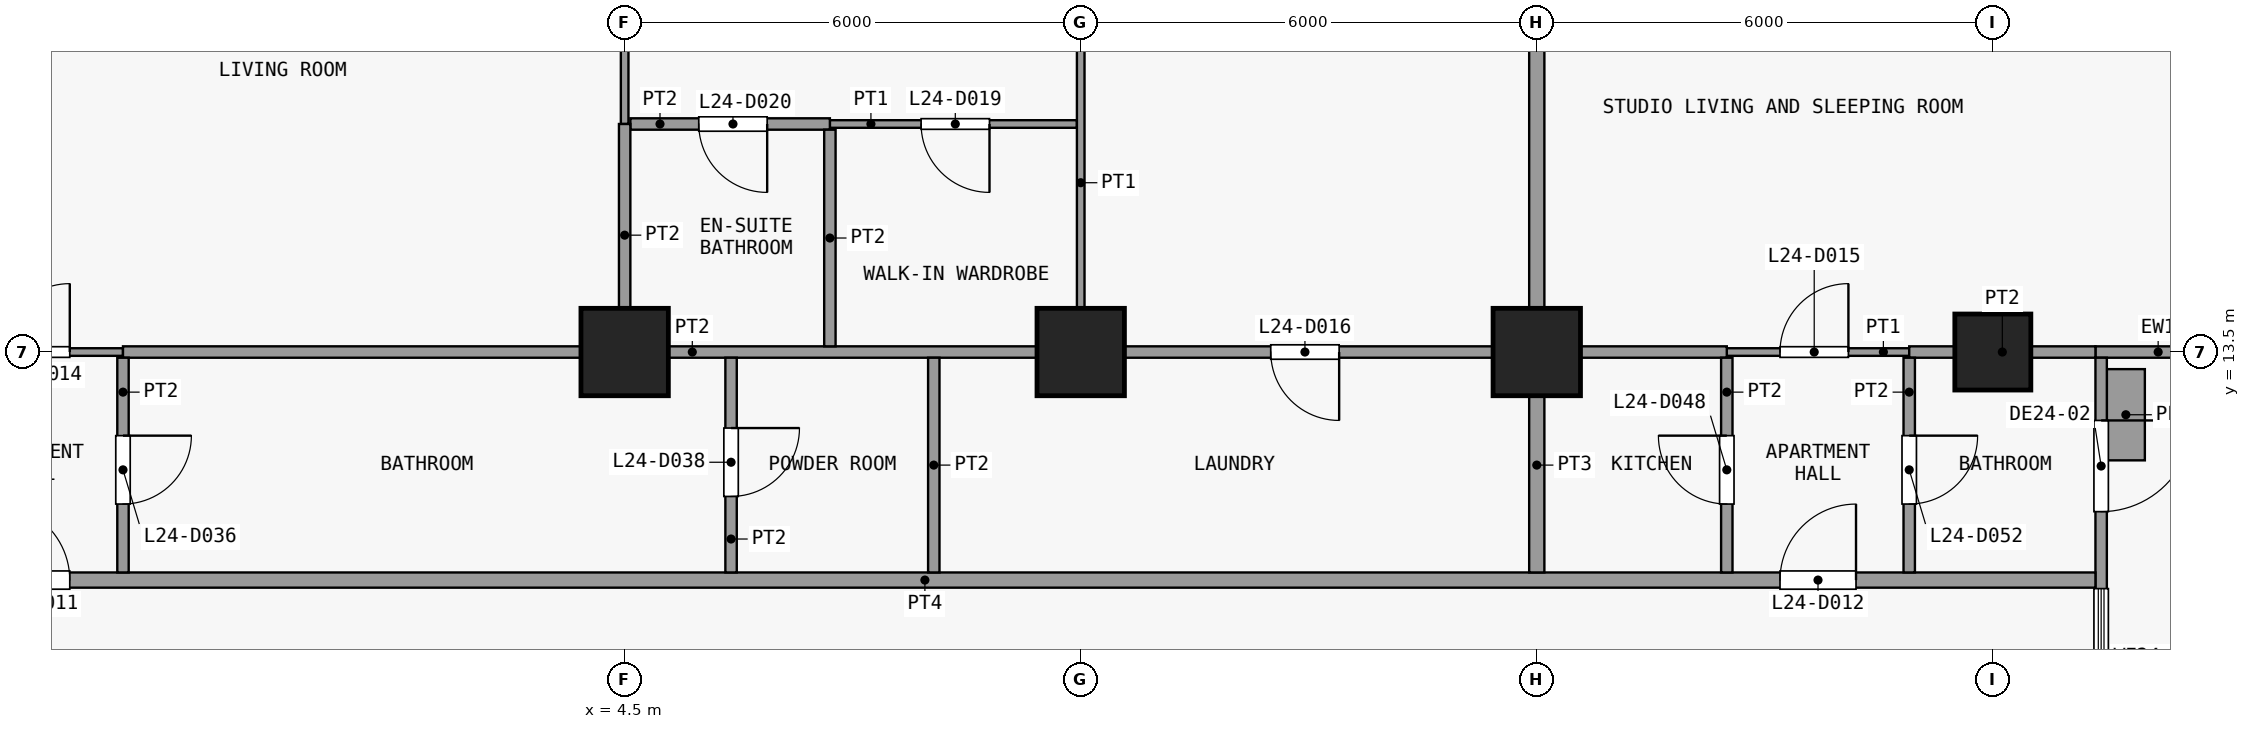
"""IFC4 building model, lengths in metres.
Left out: names, types, materials, properties, quantities, classifications, styles, units other than length and angle.
Written with IfcOpenShell. Run it as: python <this file> out.ifc"""

import sys

from ifc_helpers import new_model, si_unit, direction, frame, frame_2d, origin, origin_2d, place, context, subcontext, project, spatial, rectangle, extrude, element, fill, save


model = new_model("IFC4")
c1 = context("Model", 3, precision=1e-05, world=origin(), true_north=direction((0.0, 1.0)))
c2 = subcontext(c1, "Body", "Model", "MODEL_VIEW")
j1 = project(units=[si_unit("LENGTHUNIT", "METRE"), si_unit("PLANEANGLEUNIT", "RADIAN")], contexts=[c1])
p1 = place(None, origin())
s1 = spatial("IfcSite", under=j1, at=p1, CompositionType="ELEMENT")
p2 = place(p1, origin())
s2 = spatial("IfcBuilding", under=s1, at=p2, CompositionType="ELEMENT")
p3 = place(p2, frame((0.0, 0.0, 99.1)))
s3 = spatial("IfcBuildingStorey", under=s2, at=p3, CompositionType="ELEMENT", Elevation=99.1)
for number, where, z_axis, x_axis in (
    (1, (4.5, 13.5, 0.0), (0.0, 0.0, 1.0), (1.0, 0.0, 0.0)),
    (2, (10.5, 13.5, 0.0), (0.0, 0.0, 1.0), (1.0, 0.0, 0.0)),
    (3, (16.5, 13.5, 0.0), (0.0, 0.0, 1.0), (1.0, 0.0, 0.0)),
):
    element("IfcColumn", number, at=place(p3, frame(where, z_axis=z_axis, x_axis=x_axis)), inside=s3, PredefinedType="COLUMN", context=c2, shape_type="SweptSolid", body=[
        extrude(rectangle(XDim=1.15, YDim=1.15, at=origin_2d()), origin(), (0.0, 0.0, 1.0), 3.6),
    ])
p4 = place(p3, frame((22.5, 13.5, 0.0), z_axis=(0.0, 0.0, 1.0), x_axis=(1.0, 0.0, 0.0)))
e4 = element("IfcColumn", 4, at=p4, inside=s3, PredefinedType="COLUMN", context=c2, shape_type="SweptSolid", body=[
    extrude(rectangle(XDim=1.0, YDim=1.0, at=origin_2d()), origin(), (0.0, 0.0, 1.0), 3.6),
])
p5 = place(p3, frame((23.85, 13.5, 0.0), z_axis=(0.0, 0.0, 1.0), x_axis=(1.0, 0.0, 0.0)))
e5 = element("IfcWall", 5, at=p5, inside=s3, PredefinedType="SOLIDWALL", context=c2, shape_type="SweptSolid", body=[
    extrude(rectangle(XDim=1.65, YDim=0.15, at=frame_2d((0.825, 0.0))), origin(), (0.0, 0.0, 1.0), 3.3),
])
p6 = place(p3, frame((23.925, 13.425, 0.0), z_axis=(0.0, 0.0, 1.0), x_axis=(0.0, -1.0, 0.0)))
e6 = element("IfcWall", 6, at=p6, inside=s3, PredefinedType="SOLIDWALL", context=c2, shape_type="SweptSolid", body=[
    extrude(rectangle(XDim=5.85, YDim=0.15, at=frame_2d((2.925, 0.0))), origin(), (0.0, 0.0, 1.0), 3.3),
])
p7 = place(p6, frame((0.825, 0.0, 0.0)))
e7 = element("IfcOpeningElement", 7, at=p7, cuts=e6, PredefinedType="OPENING", context=c2, shape_type="SweptSolid", body=[
    extrude(rectangle(XDim=1.2, YDim=2.4, at=frame_2d((0.6, 1.2))), frame((0.0, 0.085, 0.0), z_axis=(0.0, -1.0, 0.0), x_axis=(1.0, 0.0, 0.0)), (0.0, 0.0, 1.0), 0.17),
])
p8 = place(p6, frame((3.038, 0.0, 0.9)))
e8 = element("IfcOpeningElement", 8, at=p8, cuts=e6, PredefinedType="OPENING", context=c2, shape_type="SweptSolid", body=[
    extrude(rectangle(XDim=1.8, YDim=2.1, at=frame_2d((0.9, 1.05))), frame((0.0, 0.085, 0.0), z_axis=(0.0, -1.0, 0.0), x_axis=(1.0, 0.0, 0.0)), (0.0, 0.0, 1.0), 0.17),
])
p9 = place(p3, frame((24.25, 12.075, 0.0), z_axis=(0.0, 0.0, 1.0), x_axis=(0.0, 1.0, 0.0)))
e9 = element("IfcWall", 9, at=p9, inside=s3, PredefinedType="USERDEFINED", context=c2, shape_type="SweptSolid", body=[
    extrude(rectangle(XDim=1.2, YDim=0.5, at=frame_2d((0.6, 0.0))), origin(), (0.0, 0.0, 1.0), 0.9),
])
p10 = place(p3, frame((-25.35, 10.5, 0.0), z_axis=(0.0, 0.0, 1.0), x_axis=(1.0, 0.0, 0.0)))
e10 = element("IfcWall", 10, at=p10, inside=s3, PredefinedType="PARTITIONING", context=c2, shape_type="SweptSolid", body=[
    extrude(rectangle(XDim=49.2, YDim=0.2, at=frame_2d((24.6, 0.0))), origin(), (0.0, 0.0, 1.0), 3.3),
])
p11 = place(p10, frame((7.05, 0.0, 0.0)))
e11 = element("IfcOpeningElement", 11, at=p11, cuts=e10, PredefinedType="OPENING", context=c2, shape_type="SweptSolid", body=[
    extrude(rectangle(XDim=1.0, YDim=2.1, at=frame_2d((0.5, 1.05))), frame((0.0, 0.11, 0.0), z_axis=(0.0, -1.0, 0.0), x_axis=(1.0, 0.0, 0.0)), (0.0, 0.0, 1.0), 0.22),
])
p12 = place(p10, frame((21.55, 0.0, 0.0)))
e12 = element("IfcOpeningElement", 12, at=p12, cuts=e10, PredefinedType="OPENING", context=c2, shape_type="SweptSolid", body=[
    extrude(rectangle(XDim=1.0, YDim=2.1, at=frame_2d((0.5, 1.05))), frame((0.0, 0.11, 0.0), z_axis=(0.0, -1.0, 0.0), x_axis=(1.0, 0.0, 0.0)), (0.0, 0.0, 1.0), 0.22),
])
p13 = place(p10, frame((45.05, 0.0, 0.0)))
e13 = element("IfcOpeningElement", 13, at=p13, cuts=e10, PredefinedType="OPENING", context=c2, shape_type="SweptSolid", body=[
    extrude(rectangle(XDim=1.0, YDim=2.1, at=frame_2d((0.5, 1.05))), frame((0.0, 0.11, 0.0), z_axis=(0.0, -1.0, 0.0), x_axis=(1.0, 0.0, 0.0)), (0.0, 0.0, 1.0), 0.22),
])
p14 = place(p3, frame((-4.5, 13.5, 0.0), z_axis=(0.0, 0.0, 1.0), x_axis=(1.0, 0.0, 0.0)))
e14 = element("IfcWall", 14, at=p14, inside=s3, PredefinedType="PARTITIONING", context=c2, shape_type="SweptSolid", body=[
    extrude(rectangle(XDim=2.4, YDim=0.1, at=frame_2d((1.2, 0.0))), origin(), (0.0, 0.0, 1.0), 3.3),
])
p15 = place(p14, frame((0.8, 0.0, 0.0)))
e15 = element("IfcOpeningElement", 15, at=p15, cuts=e14, PredefinedType="OPENING", context=c2, shape_type="SweptSolid", body=[
    extrude(rectangle(XDim=0.9, YDim=2.1, at=frame_2d((0.45, 1.05))), frame((0.0, 0.06, 0.0), z_axis=(0.0, -1.0, 0.0), x_axis=(1.0, 0.0, 0.0)), (0.0, 0.0, 1.0), 0.12),
])
p16 = place(p3, frame((19.0, 13.5, 0.0), z_axis=(0.0, 0.0, 1.0), x_axis=(1.0, 0.0, 0.0)))
e16 = element("IfcWall", 16, at=p16, inside=s3, PredefinedType="PARTITIONING", context=c2, shape_type="SweptSolid", body=[
    extrude(rectangle(XDim=2.4, YDim=0.1, at=frame_2d((1.2, 0.0))), origin(), (0.0, 0.0, 1.0), 3.3),
])
p17 = place(p16, frame((0.7, 0.0, 0.0)))
e17 = element("IfcOpeningElement", 17, at=p17, cuts=e16, PredefinedType="OPENING", context=c2, shape_type="SweptSolid", body=[
    extrude(rectangle(XDim=0.9, YDim=2.1, at=frame_2d((0.45, 1.05))), frame((0.0, 0.06, 0.0), z_axis=(0.0, -1.0, 0.0), x_axis=(1.0, 0.0, 0.0)), (0.0, 0.0, 1.0), 0.12),
])
p18 = place(p3, frame((-2.1, 13.5, 0.0), z_axis=(0.0, 0.0, 1.0), x_axis=(1.0, 0.0, 0.0)))
e18 = element("IfcWall", 18, at=p18, inside=s3, PredefinedType="PARTITIONING", context=c2, shape_type="SweptSolid", body=[
    extrude(rectangle(XDim=21.1, YDim=0.15, at=frame_2d((10.55, 0.0))), origin(), (0.0, 0.0, 1.0), 3.3),
])
p19 = place(p18, frame((15.1, 0.0, 0.0)))
e19 = element("IfcOpeningElement", 19, at=p19, cuts=e18, PredefinedType="OPENING", context=c2, shape_type="SweptSolid", body=[
    extrude(rectangle(XDim=0.9, YDim=2.1, at=frame_2d((0.45, 1.05))), frame((0.0, 0.085, 0.0), z_axis=(0.0, -1.0, 0.0), x_axis=(1.0, 0.0, 0.0)), (0.0, 0.0, 1.0), 0.17),
])
p20 = place(p3, frame((21.4, 13.5, 0.0), z_axis=(0.0, 0.0, 1.0), x_axis=(1.0, 0.0, 0.0)))
e20 = element("IfcWall", 20, at=p20, inside=s3, PredefinedType="PARTITIONING", context=c2, shape_type="SweptSolid", body=[
    extrude(rectangle(XDim=2.45, YDim=0.15, at=frame_2d((1.225, 0.0))), origin(), (0.0, 0.0, 1.0), 3.3),
])
p21 = place(p3, frame((7.2, 16.5, 0.0), z_axis=(0.0, 0.0, 1.0), x_axis=(1.0, 0.0, 0.0)))
e21 = element("IfcWall", 21, at=p21, inside=s3, PredefinedType="PARTITIONING", context=c2, shape_type="SweptSolid", body=[
    extrude(rectangle(XDim=3.25, YDim=0.1, at=frame_2d((1.625, 0.0))), origin(), (0.0, 0.0, 1.0), 3.3),
])
p22 = place(p21, frame((1.2, 0.0, 0.0)))
e22 = element("IfcOpeningElement", 22, at=p22, cuts=e21, PredefinedType="OPENING", context=c2, shape_type="SweptSolid", body=[
    extrude(rectangle(XDim=0.9, YDim=2.1, at=frame_2d((0.45, 1.05))), frame((0.0, 0.06, 0.0), z_axis=(0.0, -1.0, 0.0), x_axis=(1.0, 0.0, 0.0)), (0.0, 0.0, 1.0), 0.12),
])
p23 = place(p3, frame((4.575, 16.5, 0.0), z_axis=(0.0, 0.0, 1.0), x_axis=(1.0, 0.0, 0.0)))
e23 = element("IfcWall", 23, at=p23, inside=s3, PredefinedType="PARTITIONING", context=c2, shape_type="SweptSolid", body=[
    extrude(rectangle(XDim=2.625, YDim=0.15, at=frame_2d((1.312, 0.0))), origin(), (0.0, 0.0, 1.0), 3.3),
])
p24 = place(p23, frame((0.9, 0.0, 0.0)))
e24 = element("IfcOpeningElement", 24, at=p24, cuts=e23, PredefinedType="OPENING", context=c2, shape_type="SweptSolid", body=[
    extrude(rectangle(XDim=0.9, YDim=2.1, at=frame_2d((0.45, 1.05))), frame((0.0, 0.085, 0.0), z_axis=(0.0, -1.0, 0.0), x_axis=(1.0, 0.0, 0.0)), (0.0, 0.0, 1.0), 0.17),
])
p25 = place(p3, frame((-2.1, 10.6, 0.0), z_axis=(0.0, 0.0, 1.0), x_axis=(0.0, 1.0, 0.0)))
e25 = element("IfcWall", 25, at=p25, inside=s3, PredefinedType="PARTITIONING", context=c2, shape_type="SweptSolid", body=[
    extrude(rectangle(XDim=2.825, YDim=0.15, at=frame_2d((1.413, 0.0))), origin(), (0.0, 0.0, 1.0), 3.3),
])
p26 = place(p25, frame((0.9, 0.0, 0.0)))
e26 = element("IfcOpeningElement", 26, at=p26, cuts=e25, PredefinedType="OPENING", context=c2, shape_type="SweptSolid", body=[
    extrude(rectangle(XDim=0.9, YDim=2.1, at=frame_2d((0.45, 1.05))), frame((0.0, 0.085, 0.0), z_axis=(0.0, -1.0, 0.0), x_axis=(1.0, 0.0, 0.0)), (0.0, 0.0, 1.0), 0.17),
])
p27 = place(p3, frame((4.5, 16.5, 0.0), z_axis=(0.0, 0.0, 1.0), x_axis=(0.0, 1.0, 0.0)))
e27 = element("IfcWall", 27, at=p27, inside=s3, PredefinedType="PARTITIONING", context=c2, shape_type="SweptSolid", body=[
    extrude(rectangle(XDim=4.35, YDim=0.1, at=frame_2d((2.175, 0.0))), origin(), (0.0, 0.0, 1.0), 3.3),
])
p28 = place(p27, frame((1.5, 0.0, 0.0)))
e28 = element("IfcOpeningElement", 28, at=p28, cuts=e27, PredefinedType="OPENING", context=c2, shape_type="SweptSolid", body=[
    extrude(rectangle(XDim=0.9, YDim=2.1, at=frame_2d((0.45, 1.05))), frame((0.0, 0.06, 0.0), z_axis=(0.0, -1.0, 0.0), x_axis=(1.0, 0.0, 0.0)), (0.0, 0.0, 1.0), 0.12),
])
p29 = place(p3, frame((4.5, 13.575, 0.0), z_axis=(0.0, 0.0, 1.0), x_axis=(0.0, 1.0, 0.0)))
e29 = element("IfcWall", 29, at=p29, inside=s3, PredefinedType="PARTITIONING", context=c2, shape_type="SweptSolid", body=[
    extrude(rectangle(XDim=2.925, YDim=0.15, at=frame_2d((1.462, 0.0))), origin(), (0.0, 0.0, 1.0), 3.3),
])
p30 = place(p3, frame((5.9, 10.6, 0.0), z_axis=(0.0, 0.0, 1.0), x_axis=(0.0, 1.0, 0.0)))
e30 = element("IfcWall", 30, at=p30, inside=s3, PredefinedType="PARTITIONING", context=c2, shape_type="SweptSolid", body=[
    extrude(rectangle(XDim=2.825, YDim=0.15, at=frame_2d((1.413, 0.0))), origin(), (0.0, 0.0, 1.0), 3.3),
])
p31 = place(p30, frame((1.0, 0.0, 0.0)))
e31 = element("IfcOpeningElement", 31, at=p31, cuts=e30, PredefinedType="OPENING", context=c2, shape_type="SweptSolid", body=[
    extrude(rectangle(XDim=0.9, YDim=2.1, at=frame_2d((0.45, 1.05))), frame((0.0, 0.085, 0.0), z_axis=(0.0, -1.0, 0.0), x_axis=(1.0, 0.0, 0.0)), (0.0, 0.0, 1.0), 0.17),
])
p32 = place(p3, frame((7.2, 13.575, 0.0), z_axis=(0.0, 0.0, 1.0), x_axis=(0.0, 1.0, 0.0)))
e32 = element("IfcWall", 32, at=p32, inside=s3, PredefinedType="PARTITIONING", context=c2, shape_type="SweptSolid", body=[
    extrude(rectangle(XDim=2.85, YDim=0.15, at=frame_2d((1.425, 0.0))), origin(), (0.0, 0.0, 1.0), 3.3),
])
p33 = place(p3, frame((8.567, 10.6, 0.0), z_axis=(0.0, 0.0, 1.0), x_axis=(0.0, 1.0, 0.0)))
e33 = element("IfcWall", 33, at=p33, inside=s3, PredefinedType="PARTITIONING", context=c2, shape_type="SweptSolid", body=[
    extrude(rectangle(XDim=2.825, YDim=0.15, at=frame_2d((1.413, 0.0))), origin(), (0.0, 0.0, 1.0), 3.3),
])
p34 = place(p3, frame((10.5, 13.575, 0.0), z_axis=(0.0, 0.0, 1.0), x_axis=(0.0, 1.0, 0.0)))
e34 = element("IfcWall", 34, at=p34, inside=s3, PredefinedType="PARTITIONING", context=c2, shape_type="SweptSolid", body=[
    extrude(rectangle(XDim=8.675, YDim=0.1, at=frame_2d((4.337, 0.0))), origin(), (0.0, 0.0, 1.0), 3.3),
])
p35 = place(p34, frame((4.425, 0.0, 0.0)))
e35 = element("IfcOpeningElement", 35, at=p35, cuts=e34, PredefinedType="OPENING", context=c2, shape_type="SweptSolid", body=[
    extrude(rectangle(XDim=0.9, YDim=2.1, at=frame_2d((0.45, 1.05))), frame((0.0, 0.06, 0.0), z_axis=(0.0, -1.0, 0.0), x_axis=(1.0, 0.0, 0.0)), (0.0, 0.0, 1.0), 0.12),
])
p36 = place(p3, frame((16.5, 10.6, 0.0), z_axis=(0.0, 0.0, 1.0), x_axis=(0.0, 1.0, 0.0)))
e36 = element("IfcWall", 36, at=p36, inside=s3, PredefinedType="PARTITIONING", context=c2, shape_type="SweptSolid", body=[
    extrude(rectangle(XDim=2.825, YDim=0.2, at=frame_2d((1.413, 0.0))), origin(), (0.0, 0.0, 1.0), 3.3),
])
p37 = place(p3, frame((16.5, 13.575, 0.0), z_axis=(0.0, 0.0, 1.0), x_axis=(0.0, 1.0, 0.0)))
e37 = element("IfcWall", 37, at=p37, inside=s3, PredefinedType="PARTITIONING", context=c2, shape_type="SweptSolid", body=[
    extrude(rectangle(XDim=8.675, YDim=0.2, at=frame_2d((4.337, 0.0))), origin(), (0.0, 0.0, 1.0), 3.3),
])
p38 = place(p3, frame((19.0, 10.6, 0.0), z_axis=(0.0, 0.0, 1.0), x_axis=(0.0, 1.0, 0.0)))
e38 = element("IfcWall", 38, at=p38, inside=s3, PredefinedType="PARTITIONING", context=c2, shape_type="SweptSolid", body=[
    extrude(rectangle(XDim=2.825, YDim=0.15, at=frame_2d((1.413, 0.0))), origin(), (0.0, 0.0, 1.0), 3.3),
])
p39 = place(p38, frame((0.9, 0.0, 0.0)))
e39 = element("IfcOpeningElement", 39, at=p39, cuts=e38, PredefinedType="OPENING", context=c2, shape_type="SweptSolid", body=[
    extrude(rectangle(XDim=0.9, YDim=2.1, at=frame_2d((0.45, 1.05))), frame((0.0, 0.085, 0.0), z_axis=(0.0, -1.0, 0.0), x_axis=(1.0, 0.0, 0.0)), (0.0, 0.0, 1.0), 0.17),
])
p40 = place(p3, frame((21.4, 10.6, 0.0), z_axis=(0.0, 0.0, 1.0), x_axis=(0.0, 1.0, 0.0)))
e40 = element("IfcWall", 40, at=p40, inside=s3, PredefinedType="PARTITIONING", context=c2, shape_type="SweptSolid", body=[
    extrude(rectangle(XDim=2.825, YDim=0.15, at=frame_2d((1.413, 0.0))), origin(), (0.0, 0.0, 1.0), 3.3),
])
p41 = place(p40, frame((0.9, 0.0, 0.0)))
e41 = element("IfcOpeningElement", 41, at=p41, cuts=e40, PredefinedType="OPENING", context=c2, shape_type="SweptSolid", body=[
    extrude(rectangle(XDim=0.9, YDim=2.1, at=frame_2d((0.45, 1.05))), frame((0.0, 0.085, 0.0), z_axis=(0.0, -1.0, 0.0), x_axis=(1.0, 0.0, 0.0)), (0.0, 0.0, 1.0), 0.17),
])
p42 = place(p7, origin())
e42 = element("IfcDoor", 42, at=p42, inside=s3, OperationType="SINGLE_SWING_LEFT", PredefinedType="DOOR", context=c2, shape_type="SweptSolid", body=[
    extrude(rectangle(XDim=1.2, YDim=2.4, at=frame_2d((0.6, 1.2))), frame((0.0, 0.025, 0.0), z_axis=(0.0, -1.0, 0.0), x_axis=(1.0, 0.0, 0.0)), (0.0, 0.0, 1.0), 0.05),
])
fill(e7, e42)
p43 = place(p8, origin())
e43 = element("IfcWindow", 43, at=p43, inside=s3, PartitioningType="SINGLE_PANEL", PredefinedType="WINDOW", context=c2, shape_type="SweptSolid", body=[
    extrude(rectangle(XDim=1.8, YDim=2.1, at=frame_2d((0.9, 1.05))), frame((0.0, 0.03, 0.0), z_axis=(0.0, -1.0, 0.0), x_axis=(1.0, 0.0, 0.0)), (0.0, 0.0, 1.0), 0.06),
])
fill(e8, e43)
p44 = place(p12, origin())
e44 = element("IfcDoor", 44, at=p44, inside=s3, OperationType="SINGLE_SWING_RIGHT", PredefinedType="DOOR", context=c2, shape_type="SweptSolid", body=[
    extrude(rectangle(XDim=1.0, YDim=2.1, at=frame_2d((0.5, 1.05))), frame((0.0, 0.025, 0.0), z_axis=(0.0, -1.0, 0.0), x_axis=(1.0, 0.0, 0.0)), (0.0, 0.0, 1.0), 0.05),
])
fill(e12, e44)
p45 = place(p13, origin())
e45 = element("IfcDoor", 45, at=p45, inside=s3, OperationType="SINGLE_SWING_LEFT", PredefinedType="DOOR", context=c2, shape_type="SweptSolid", body=[
    extrude(rectangle(XDim=1.0, YDim=2.1, at=frame_2d((0.5, 1.05))), frame((0.0, 0.025, 0.0), z_axis=(0.0, -1.0, 0.0), x_axis=(1.0, 0.0, 0.0)), (0.0, 0.0, 1.0), 0.05),
])
fill(e13, e45)
p46 = place(p15, origin())
e46 = element("IfcDoor", 46, at=p46, inside=s3, OperationType="SINGLE_SWING_LEFT", PredefinedType="DOOR", context=c2, shape_type="SweptSolid", body=[
    extrude(rectangle(XDim=0.9, YDim=2.1, at=frame_2d((0.45, 1.05))), frame((0.0, 0.025, 0.0), z_axis=(0.0, -1.0, 0.0), x_axis=(1.0, 0.0, 0.0)), (0.0, 0.0, 1.0), 0.05),
])
fill(e15, e46)
p47 = place(p17, origin())
e47 = element("IfcDoor", 47, at=p47, inside=s3, OperationType="SINGLE_SWING_LEFT", PredefinedType="DOOR", context=c2, shape_type="SweptSolid", body=[
    extrude(rectangle(XDim=0.9, YDim=2.1, at=frame_2d((0.45, 1.05))), frame((0.0, 0.025, 0.0), z_axis=(0.0, -1.0, 0.0), x_axis=(1.0, 0.0, 0.0)), (0.0, 0.0, 1.0), 0.05),
])
fill(e17, e47)
p48 = place(p19, origin())
e48 = element("IfcDoor", 48, at=p48, inside=s3, OperationType="SINGLE_SWING_RIGHT", PredefinedType="DOOR", context=c2, shape_type="SweptSolid", body=[
    extrude(rectangle(XDim=0.9, YDim=2.1, at=frame_2d((0.45, 1.05))), frame((0.0, 0.025, 0.0), z_axis=(0.0, -1.0, 0.0), x_axis=(1.0, 0.0, 0.0)), (0.0, 0.0, 1.0), 0.05),
])
fill(e19, e48)
p49 = place(p22, origin())
e49 = element("IfcDoor", 49, at=p49, inside=s3, OperationType="SINGLE_SWING_RIGHT", PredefinedType="DOOR", context=c2, shape_type="SweptSolid", body=[
    extrude(rectangle(XDim=0.9, YDim=2.1, at=frame_2d((0.45, 1.05))), frame((0.0, 0.025, 0.0), z_axis=(0.0, -1.0, 0.0), x_axis=(1.0, 0.0, 0.0)), (0.0, 0.0, 1.0), 0.05),
])
fill(e22, e49)
p50 = place(p24, origin())
e50 = element("IfcDoor", 50, at=p50, inside=s3, OperationType="SINGLE_SWING_RIGHT", PredefinedType="DOOR", context=c2, shape_type="SweptSolid", body=[
    extrude(rectangle(XDim=0.9, YDim=2.1, at=frame_2d((0.45, 1.05))), frame((0.0, 0.025, 0.0), z_axis=(0.0, -1.0, 0.0), x_axis=(1.0, 0.0, 0.0)), (0.0, 0.0, 1.0), 0.05),
])
fill(e24, e50)
p51 = place(p26, origin())
e51 = element("IfcDoor", 51, at=p51, inside=s3, OperationType="SINGLE_SWING_RIGHT", PredefinedType="DOOR", context=c2, shape_type="SweptSolid", body=[
    extrude(rectangle(XDim=0.9, YDim=2.1, at=frame_2d((0.45, 1.05))), frame((0.0, 0.025, 0.0), z_axis=(0.0, -1.0, 0.0), x_axis=(1.0, 0.0, 0.0)), (0.0, 0.0, 1.0), 0.05),
])
fill(e26, e51)
p52 = place(p31, origin())
e52 = element("IfcDoor", 52, at=p52, inside=s3, OperationType="SINGLE_SWING_RIGHT", PredefinedType="DOOR", context=c2, shape_type="SweptSolid", body=[
    extrude(rectangle(XDim=0.9, YDim=2.1, at=frame_2d((0.45, 1.05))), frame((0.0, 0.025, 0.0), z_axis=(0.0, -1.0, 0.0), x_axis=(1.0, 0.0, 0.0)), (0.0, 0.0, 1.0), 0.05),
])
fill(e31, e52)
p53 = place(p39, origin())
e53 = element("IfcDoor", 53, at=p53, inside=s3, OperationType="SINGLE_SWING_LEFT", PredefinedType="DOOR", context=c2, shape_type="SweptSolid", body=[
    extrude(rectangle(XDim=0.9, YDim=2.1, at=frame_2d((0.45, 1.05))), frame((0.0, 0.025, 0.0), z_axis=(0.0, -1.0, 0.0), x_axis=(1.0, 0.0, 0.0)), (0.0, 0.0, 1.0), 0.05),
])
fill(e39, e53)
p54 = place(p41, origin())
e54 = element("IfcDoor", 54, at=p54, inside=s3, OperationType="SINGLE_SWING_RIGHT", PredefinedType="DOOR", context=c2, shape_type="SweptSolid", body=[
    extrude(rectangle(XDim=0.9, YDim=2.1, at=frame_2d((0.45, 1.05))), frame((0.0, 0.025, 0.0), z_axis=(0.0, -1.0, 0.0), x_axis=(1.0, 0.0, 0.0)), (0.0, 0.0, 1.0), 0.05),
])
fill(e41, e54)
save(model, sys.argv[1])
